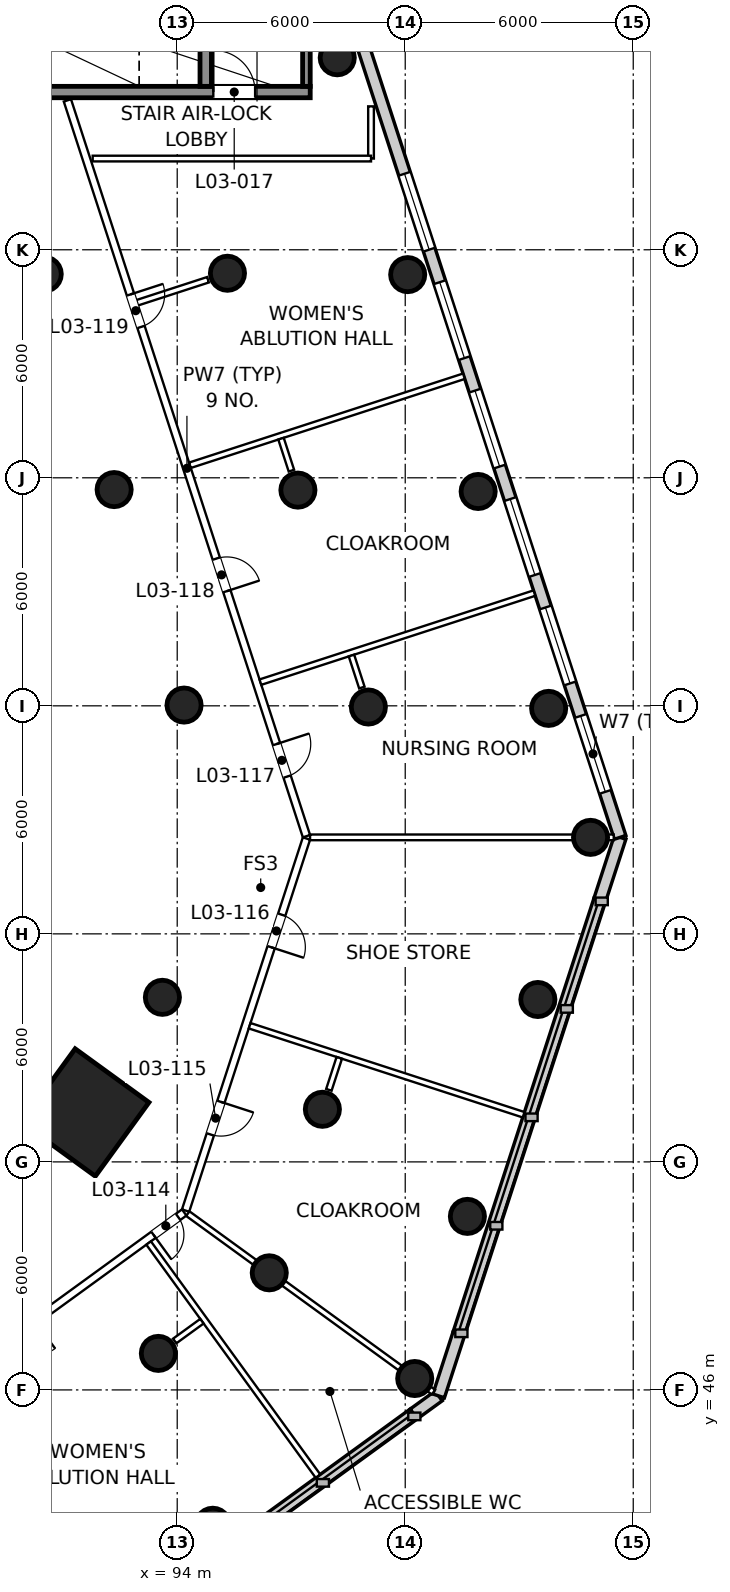
"""IFC4 building model, lengths in metres.
Left out: names, types, materials, properties, quantities, classifications, styles, units other than length and angle.
Written with IfcOpenShell. Run it as: python <this file> out.ifc"""

import sys

from ifc_helpers import new_model, si_unit, direction, frame, frame_2d, origin, origin_2d, place, context, subcontext, project, spatial, rectangle, circle, extrude, element, fill, save


model = new_model("IFC4")
c1 = context("Model", 3, precision=1e-05, world=origin(), true_north=direction((0.0, 1.0)))
c2 = subcontext(c1, "Body", "Model", "MODEL_VIEW")
j1 = project(units=[si_unit("LENGTHUNIT", "METRE"), si_unit("PLANEANGLEUNIT", "RADIAN")], contexts=[c1])
p1 = place(None, origin())
s1 = spatial("IfcSite", under=j1, at=p1, CompositionType="ELEMENT")
p2 = place(p1, origin())
s2 = spatial("IfcBuilding", under=s1, at=p2, CompositionType="ELEMENT")
p3 = place(p2, frame((0.0, 0.0, 23.0)))
s3 = spatial("IfcBuildingStorey", under=s2, at=p3, CompositionType="ELEMENT", Elevation=23.0)
p4 = place(p3, frame((91.58, 53.3, 0.0), z_axis=(0.0, 0.0, 1.0), x_axis=(0.809016994375, -0.587785252292, 0.0)))
e1 = element("IfcColumn", 1, at=p4, inside=s3, PredefinedType="COLUMN", context=c2, shape_type="SweptSolid", body=[
    extrude(rectangle(XDim=2.4, YDim=2.4, at=origin_2d()), origin(), (0.0, 0.0, 1.0), 6.0),
])
for number, where, z_axis, x_axis in (
    (2, (93.61, 56.33, 0.0), (0.0, 0.0, 1.0), (1.0, 0.0, 0.0)),
    (3, (94.18, 64.02, 0.0), (0.0, 0.0, 1.0), (1.0, 0.0, 0.0)),
    (4, (92.34, 69.69, 0.0), (0.0, 0.0, 1.0), (1.0, 0.0, 0.0)),
    (5, (90.5, 75.36, 0.0), (0.0, 0.0, 1.0), (1.0, 0.0, 0.0)),
    (6, (94.936, 42.439, 0.0), (0.0, 0.0, 1.0), (1.0, 0.0, 0.0)),
    (7, (100.25, 46.3, 0.0), (0.0, 0.0, 1.0), (1.0, 0.0, 0.0)),
    (8, (101.636, 50.566, 0.0), (0.0, 0.0, 1.0), (1.0, 0.0, 0.0)),
    (9, (103.49, 56.273, 0.0), (0.0, 0.0, 1.0), (1.0, 0.0, 0.0)),
    (10, (104.876, 60.539, 0.0), (0.0, 0.0, 1.0), (1.0, 0.0, 0.0)),
    (11, (103.774, 63.933, 0.0), (0.0, 0.0, 1.0), (1.0, 0.0, 0.0)),
    (12, (101.919, 69.64, 0.0), (0.0, 0.0, 1.0), (1.0, 0.0, 0.0)),
    (13, (100.065, 75.346, 0.0), (0.0, 0.0, 1.0), (1.0, 0.0, 0.0)),
    (14, (98.211, 81.052, 0.0), (0.0, 0.0, 1.0), (1.0, 0.0, 0.0)),
    (15, (93.504, 46.961, 0.0), (0.0, 0.0, 1.0), (1.0, 0.0, 0.0)),
    (16, (96.422, 49.081, 0.0), (0.0, 0.0, 1.0), (1.0, 0.0, 0.0)),
    (17, (97.82, 53.384, 0.0), (0.0, 0.0, 1.0), (1.0, 0.0, 0.0)),
    (18, (99.03, 63.969, 0.0), (0.0, 0.0, 1.0), (1.0, 0.0, 0.0)),
    (19, (97.176, 69.676, 0.0), (0.0, 0.0, 1.0), (1.0, 0.0, 0.0)),
    (20, (95.322, 75.382, 0.0), (0.0, 0.0, 1.0), (1.0, 0.0, 0.0)),
):
    element("IfcColumn", number, at=place(p3, frame(where, z_axis=z_axis, x_axis=x_axis)), inside=s3, PredefinedType="COLUMN", context=c2, shape_type="SweptSolid", body=[
        extrude(circle(Radius=0.45, at=origin_2d()), origin(), (0.0, 0.0, 1.0), 6.0),
    ])
p5 = place(p3, frame((78.381, 29.497, 0.0), z_axis=(0.0, 0.0, 1.0), x_axis=(0.809019086344, 0.587782372933, 0.0)))
e21 = element("IfcWall", 21, at=p5, inside=s3, PredefinedType="SOLIDWALL", context=c2, shape_type="SweptSolid", body=[
    extrude(rectangle(XDim=27.0, YDim=0.32, at=frame_2d((13.5, 0.0))), origin(), (0.0, 0.0, 1.0), 1.0),
])
p6 = place(p3, frame((100.225, 45.367, 0.0), z_axis=(0.0, 0.0, 1.0), x_axis=(0.808957761835, 0.587866770252, 0.0)))
e22 = element("IfcWall", 22, at=p6, inside=s3, PredefinedType="SOLIDWALL", context=c2, shape_type="SweptSolid", body=[
    extrude(rectangle(XDim=0.809, YDim=0.32, at=frame_2d((0.405, 0.0))), origin(), (0.0, 0.0, 1.0), 5.65),
])
p7 = place(p3, frame((100.879, 45.843, 0.0), z_axis=(0.0, 0.0, 1.0), x_axis=(0.309006126888, 0.951060047287, 0.0)))
e23 = element("IfcWall", 23, at=p7, inside=s3, PredefinedType="SOLIDWALL", context=c2, shape_type="SweptSolid", body=[
    extrude(rectangle(XDim=1.726, YDim=0.32, at=frame_2d((0.863, 0.0))), origin(), (0.0, 0.0, 1.0), 5.65),
])
p8 = place(p3, frame((101.413, 47.485, 0.0), z_axis=(0.0, 0.0, 1.0), x_axis=(0.309022586479, 0.951054699292, 0.0)))
e24 = element("IfcWall", 24, at=p8, inside=s3, PredefinedType="SOLIDWALL", context=c2, shape_type="SweptSolid", body=[
    extrude(rectangle(XDim=12.0, YDim=0.32, at=frame_2d((6.0, 0.0))), origin(), (0.0, 0.0, 1.0), 1.0),
])
p9 = place(p3, frame((105.121, 58.897, 0.0), z_axis=(0.0, 0.0, 1.0), x_axis=(0.309006126888, 0.951060047287, 0.0)))
e25 = element("IfcWall", 25, at=p9, inside=s3, PredefinedType="SOLIDWALL", context=c2, shape_type="SweptSolid", body=[
    extrude(rectangle(XDim=1.726, YDim=0.32, at=frame_2d((0.863, 0.0))), origin(), (0.0, 0.0, 1.0), 5.65),
])
p10 = place(p3, frame((105.655, 60.539, 0.0), z_axis=(0.0, 0.0, 1.0), x_axis=(-0.309020996945, 0.951055215772, 0.0)))
e26 = element("IfcWall", 26, at=p10, inside=s3, PredefinedType="SOLIDWALL", context=c2, shape_type="SweptSolid", body=[
    extrude(rectangle(XDim=25.704, YDim=0.32, at=frame_2d((12.852, 0.0))), origin(), (0.0, 0.0, 1.0), 5.65),
])
p11 = place(p10, frame((1.259, 0.0, 0.9)))
e27 = element("IfcOpeningElement", 27, at=p11, cuts=e26, PredefinedType="OPENING", context=c2, shape_type="SweptSolid", body=[
    extrude(rectangle(XDim=2.1, YDim=3.0, at=frame_2d((1.05, 1.5))), frame((0.0, 0.17, 0.0), z_axis=(0.0, -1.0, 0.0), x_axis=(1.0, 0.0, 0.0)), (0.0, 0.0, 1.0), 0.34),
])
p12 = place(p10, frame((4.259, 0.0, 0.9)))
e28 = element("IfcOpeningElement", 28, at=p12, cuts=e26, PredefinedType="OPENING", context=c2, shape_type="SweptSolid", body=[
    extrude(rectangle(XDim=2.1, YDim=3.0, at=frame_2d((1.05, 1.5))), frame((0.0, 0.17, 0.0), z_axis=(0.0, -1.0, 0.0), x_axis=(1.0, 0.0, 0.0)), (0.0, 0.0, 1.0), 0.34),
])
p13 = place(p10, frame((7.259, 0.0, 0.9)))
e29 = element("IfcOpeningElement", 29, at=p13, cuts=e26, PredefinedType="OPENING", context=c2, shape_type="SweptSolid", body=[
    extrude(rectangle(XDim=2.1, YDim=3.0, at=frame_2d((1.05, 1.5))), frame((0.0, 0.17, 0.0), z_axis=(0.0, -1.0, 0.0), x_axis=(1.0, 0.0, 0.0)), (0.0, 0.0, 1.0), 0.34),
])
p14 = place(p10, frame((10.259, 0.0, 0.9)))
e30 = element("IfcOpeningElement", 30, at=p14, cuts=e26, PredefinedType="OPENING", context=c2, shape_type="SweptSolid", body=[
    extrude(rectangle(XDim=2.1, YDim=3.0, at=frame_2d((1.05, 1.5))), frame((0.0, 0.17, 0.0), z_axis=(0.0, -1.0, 0.0), x_axis=(1.0, 0.0, 0.0)), (0.0, 0.0, 1.0), 0.34),
])
p15 = place(p10, frame((13.259, 0.0, 0.9)))
e31 = element("IfcOpeningElement", 31, at=p15, cuts=e26, PredefinedType="OPENING", context=c2, shape_type="SweptSolid", body=[
    extrude(rectangle(XDim=2.1, YDim=3.0, at=frame_2d((1.05, 1.5))), frame((0.0, 0.17, 0.0), z_axis=(0.0, -1.0, 0.0), x_axis=(1.0, 0.0, 0.0)), (0.0, 0.0, 1.0), 0.34),
])
p16 = place(p10, frame((16.259, 0.0, 0.9)))
e32 = element("IfcOpeningElement", 32, at=p16, cuts=e26, PredefinedType="OPENING", context=c2, shape_type="SweptSolid", body=[
    extrude(rectangle(XDim=2.1, YDim=3.0, at=frame_2d((1.05, 1.5))), frame((0.0, 0.17, 0.0), z_axis=(0.0, -1.0, 0.0), x_axis=(1.0, 0.0, 0.0)), (0.0, 0.0, 1.0), 0.34),
])
p17 = place(p3, frame((85.6, 80.15, 0.0), z_axis=(0.0, 0.0, 1.0), x_axis=(1.0, 0.0, 0.0)))
e33 = element("IfcWall", 33, at=p17, inside=s3, PredefinedType="SHEAR", context=c2, shape_type="SweptSolid", body=[
    extrude(rectangle(XDim=11.9, YDim=0.3, at=frame_2d((5.95, 0.0))), origin(), (0.0, 0.0, 1.0), 6.0),
])
p18 = place(p17, frame((9.35, 0.0, 0.0)))
e34 = element("IfcOpeningElement", 34, at=p18, cuts=e33, PredefinedType="OPENING", context=c2, shape_type="SweptSolid", body=[
    extrude(rectangle(XDim=1.1, YDim=2.1, at=frame_2d((0.55, 1.05))), frame((0.0, 0.16, 0.0), z_axis=(0.0, -1.0, 0.0), x_axis=(1.0, 0.0, 0.0)), (0.0, 0.0, 1.0), 0.32),
])
p19 = place(p3, frame((94.75, 80.3, 0.0), z_axis=(0.0, 0.0, 1.0), x_axis=(0.0, 1.0, 0.0)))
e35 = element("IfcWall", 35, at=p19, inside=s3, PredefinedType="SHEAR", context=c2, shape_type="SweptSolid", body=[
    extrude(rectangle(XDim=3.35, YDim=0.3, at=frame_2d((1.675, 0.0))), origin(), (0.0, 0.0, 1.0), 6.0),
])
p20 = place(p19, frame((1.075, 0.0, 0.0)))
e36 = element("IfcOpeningElement", 36, at=p20, cuts=e35, PredefinedType="OPENING", context=c2, shape_type="SweptSolid", body=[
    extrude(rectangle(XDim=1.2, YDim=2.1, at=frame_2d((0.6, 1.05))), frame((0.0, 0.16, 0.0), z_axis=(0.0, -1.0, 0.0), x_axis=(1.0, 0.0, 0.0)), (0.0, 0.0, 1.0), 0.32),
])
p21 = place(p3, frame((97.4, 80.3, 0.0), z_axis=(0.0, 0.0, 1.0), x_axis=(0.0, 1.0, 0.0)))
e37 = element("IfcWall", 37, at=p21, inside=s3, PredefinedType="SHEAR", context=c2, shape_type="SweptSolid", body=[
    extrude(rectangle(XDim=3.35, YDim=0.2, at=frame_2d((1.675, 0.0))), origin(), (0.0, 0.0, 1.0), 6.0),
])
p22 = place(p3, frame((91.11, 79.931, 0.0), z_axis=(0.0, 0.0, 1.0), x_axis=(0.309008514197, -0.95105927163, 0.0)))
e38 = element("IfcWall", 38, at=p22, inside=s3, PredefinedType="PARTITIONING", context=c2, shape_type="SweptSolid", body=[
    extrude(rectangle(XDim=20.357, YDim=0.2, at=frame_2d((10.179, 0.0))), origin(), (0.0, 0.0, 1.0), 5.65),
])
p23 = place(p22, frame((17.809, 0.0, 0.0)))
e39 = element("IfcOpeningElement", 39, at=p23, cuts=e38, PredefinedType="OPENING", context=c2, shape_type="SweptSolid", body=[
    extrude(rectangle(XDim=0.9, YDim=2.1, at=frame_2d((0.45, 1.05))), frame((0.0, 0.11, 0.0), z_axis=(0.0, -1.0, 0.0), x_axis=(1.0, 0.0, 0.0)), (0.0, 0.0, 1.0), 0.22),
])
p24 = place(p22, frame((12.678, 0.0, 0.0)))
e40 = element("IfcOpeningElement", 40, at=p24, cuts=e38, PredefinedType="OPENING", context=c2, shape_type="SweptSolid", body=[
    extrude(rectangle(XDim=0.9, YDim=2.1, at=frame_2d((0.45, 1.05))), frame((0.0, 0.11, 0.0), z_axis=(0.0, -1.0, 0.0), x_axis=(1.0, 0.0, 0.0)), (0.0, 0.0, 1.0), 0.22),
])
p25 = place(p22, frame((5.369, 0.0, 0.0)))
e41 = element("IfcOpeningElement", 41, at=p25, cuts=e38, PredefinedType="OPENING", context=c2, shape_type="SweptSolid", body=[
    extrude(rectangle(XDim=0.9, YDim=2.1, at=frame_2d((0.45, 1.05))), frame((0.0, 0.11, 0.0), z_axis=(0.0, -1.0, 0.0), x_axis=(1.0, 0.0, 0.0)), (0.0, 0.0, 1.0), 0.22),
])
p26 = place(p3, frame((97.401, 60.508, 0.0), z_axis=(0.0, 0.0, 1.0), x_axis=(-0.309010449617, -0.951058642791, 0.0)))
e42 = element("IfcWall", 42, at=p26, inside=s3, PredefinedType="PARTITIONING", context=c2, shape_type="SweptSolid", body=[
    extrude(rectangle(XDim=10.293, YDim=0.2, at=frame_2d((5.146, 0.0))), origin(), (0.0, 0.0, 1.0), 5.65),
])
p27 = place(p26, frame((7.286, 0.0, 0.0)))
e43 = element("IfcOpeningElement", 43, at=p27, cuts=e42, PredefinedType="OPENING", context=c2, shape_type="SweptSolid", body=[
    extrude(rectangle(XDim=0.9, YDim=2.1, at=frame_2d((0.45, 1.05))), frame((0.0, 0.11, 0.0), z_axis=(0.0, -1.0, 0.0), x_axis=(1.0, 0.0, 0.0)), (0.0, 0.0, 1.0), 0.22),
])
p28 = place(p26, frame((2.107, 0.0, 0.0)))
e44 = element("IfcOpeningElement", 44, at=p28, cuts=e42, PredefinedType="OPENING", context=c2, shape_type="SweptSolid", body=[
    extrude(rectangle(XDim=0.9, YDim=2.1, at=frame_2d((0.45, 1.05))), frame((0.0, 0.11, 0.0), z_axis=(0.0, -1.0, 0.0), x_axis=(1.0, 0.0, 0.0)), (0.0, 0.0, 1.0), 0.22),
])
p29 = place(p3, frame((94.184, 50.669, 0.0), z_axis=(0.0, 0.0, 1.0), x_axis=(-0.809025571226, -0.587773447089, 0.0)))
e45 = element("IfcWall", 45, at=p29, inside=s3, PredefinedType="PARTITIONING", context=c2, shape_type="SweptSolid", body=[
    extrude(rectangle(XDim=11.156, YDim=0.2, at=frame_2d((5.578, 0.0))), origin(), (0.0, 0.0, 1.0), 5.65),
])
p30 = place(p29, frame((4.852, 0.0, 0.0)))
e46 = element("IfcOpeningElement", 46, at=p30, cuts=e45, PredefinedType="OPENING", context=c2, shape_type="SweptSolid", body=[
    extrude(rectangle(XDim=0.9, YDim=2.1, at=frame_2d((0.45, 1.05))), frame((0.0, 0.11, 0.0), z_axis=(0.0, -1.0, 0.0), x_axis=(1.0, 0.0, 0.0)), (0.0, 0.0, 1.0), 0.22),
])
p31 = place(p29, frame((0.198, 0.0, 0.0)))
e47 = element("IfcOpeningElement", 47, at=p31, cuts=e45, PredefinedType="OPENING", context=c2, shape_type="SweptSolid", body=[
    extrude(rectangle(XDim=0.8, YDim=2.1, at=frame_2d((0.4, 1.05))), frame((0.0, 0.11, 0.0), z_axis=(0.0, -1.0, 0.0), x_axis=(1.0, 0.0, 0.0)), (0.0, 0.0, 1.0), 0.22),
])
p32 = place(p3, frame((100.743, 45.942, 0.0), z_axis=(0.0, 0.0, 1.0), x_axis=(-0.80901214883, 0.587791921556, 0.0)))
e48 = element("IfcWall", 48, at=p32, inside=s3, PredefinedType="PARTITIONING", context=c2, shape_type="SweptSolid", body=[
    extrude(rectangle(XDim=7.99, YDim=0.15, at=frame_2d((3.995, 0.0))), origin(), (0.0, 0.0, 1.0), 5.65),
])
p33 = place(p3, frame((105.486, 60.539, 0.0), z_axis=(0.0, 0.0, 1.0), x_axis=(-1.0, 0.0, 0.0)))
e49 = element("IfcWall", 49, at=p33, inside=s3, PredefinedType="PARTITIONING", context=c2, shape_type="SweptSolid", body=[
    extrude(rectangle(XDim=7.99, YDim=0.15, at=frame_2d((3.995, 0.0))), origin(), (0.0, 0.0, 1.0), 4.75),
])
p34 = place(p3, frame((97.704, 43.733, 0.0), z_axis=(0.0, 0.0, 1.0), x_axis=(-0.587800109381, 0.80900619986, 0.0)))
e50 = element("IfcWall", 50, at=p34, inside=s3, PredefinedType="PARTITIONING", context=c2, shape_type="SweptSolid", body=[
    extrude(rectangle(XDim=7.58, YDim=0.15, at=frame_2d((3.79, 0.0))), origin(), (0.0, 0.0, 1.0), 4.95),
])
p35 = place(p3, frame((103.115, 53.24, 0.0), z_axis=(0.0, 0.0, 1.0), x_axis=(-0.951058681979, 0.309010329007, 0.0)))
e51 = element("IfcWall", 51, at=p35, inside=s3, PredefinedType="PARTITIONING", context=c2, shape_type="SweptSolid", body=[
    extrude(rectangle(XDim=7.58, YDim=0.15, at=frame_2d((3.79, 0.0))), origin(), (0.0, 0.0, 1.0), 4.75),
])
p36 = place(p3, frame((103.398, 66.966, 0.0), z_axis=(0.0, 0.0, 1.0), x_axis=(-0.951049215908, -0.309039461753, 0.0)))
e52 = element("IfcWall", 52, at=p36, inside=s3, PredefinedType="PARTITIONING", context=c2, shape_type="SweptSolid", body=[
    extrude(rectangle(XDim=7.58, YDim=0.15, at=frame_2d((3.79, 0.0))), origin(), (0.0, 0.0, 1.0), 4.95),
])
p37 = place(p3, frame((101.544, 72.672, 0.0), z_axis=(0.0, 0.0, 1.0), x_axis=(-0.951052291841, -0.309029995605, 0.0)))
e53 = element("IfcWall", 53, at=p37, inside=s3, PredefinedType="PARTITIONING", context=c2, shape_type="SweptSolid", body=[
    extrude(rectangle(XDim=7.58, YDim=0.15, at=frame_2d((3.79, 0.0))), origin(), (0.0, 0.0, 1.0), 4.95),
])
p38 = place(p3, frame((93.934, 47.288, 0.0), z_axis=(0.0, 0.0, 1.0), x_axis=(0.809105603792, 0.587663272557, 0.0)))
e54 = element("IfcWall", 54, at=p38, inside=s3, PredefinedType="PARTITIONING", context=c2, shape_type="SweptSolid", body=[
    extrude(rectangle(XDim=0.885, YDim=0.15, at=frame_2d((0.443, 0.0))), origin(), (0.0, 0.0, 1.0), 4.95),
])
p39 = place(p3, frame((97.991, 53.896, 0.0), z_axis=(0.0, 0.0, 1.0), x_axis=(0.308848908026, 0.95111111444, 0.0)))
e55 = element("IfcWall", 55, at=p39, inside=s3, PredefinedType="PARTITIONING", context=c2, shape_type="SweptSolid", body=[
    extrude(rectangle(XDim=0.885, YDim=0.15, at=frame_2d((0.442, 0.0))), origin(), (0.0, 0.0, 1.0), 4.75),
])
p40 = place(p3, frame((98.859, 64.481, 0.0), z_axis=(0.0, 0.0, 1.0), x_axis=(-0.30918585584, 0.951001633305, 0.0)))
e56 = element("IfcWall", 56, at=p40, inside=s3, PredefinedType="PARTITIONING", context=c2, shape_type="SweptSolid", body=[
    extrude(rectangle(XDim=0.885, YDim=0.15, at=frame_2d((0.443, 0.0))), origin(), (0.0, 0.0, 1.0), 4.95),
])
p41 = place(p3, frame((97.005, 70.188, 0.0), z_axis=(0.0, 0.0, 1.0), x_axis=(-0.309017445354, 0.951056369763, 0.0)))
e57 = element("IfcWall", 57, at=p41, inside=s3, PredefinedType="PARTITIONING", context=c2, shape_type="SweptSolid", body=[
    extrude(rectangle(XDim=0.885, YDim=0.15, at=frame_2d((0.442, 0.0))), origin(), (0.0, 0.0, 1.0), 4.95),
])
p42 = place(p3, frame((94.81, 75.211, 0.0), z_axis=(0.0, 0.0, 1.0), x_axis=(-0.951047798727, -0.309043823005, 0.0)))
e58 = element("IfcWall", 58, at=p42, inside=s3, PredefinedType="PARTITIONING", context=c2, shape_type="SweptSolid", body=[
    extrude(rectangle(XDim=1.96, YDim=0.15, at=frame_2d((0.98, 0.0))), origin(), (0.0, 0.0, 1.0), 5.65),
])
p43 = place(p3, frame((99.1, 78.4, 0.0), z_axis=(0.0, 0.0, 1.0), x_axis=(0.0, 1.0, 0.0)))
e59 = element("IfcWall", 59, at=p43, inside=s3, PredefinedType="PARTITIONING", context=c2, shape_type="SweptSolid", body=[
    extrude(rectangle(XDim=1.374, YDim=0.15, at=frame_2d((0.687, 0.0))), origin(), (0.0, 0.0, 1.0), 4.95),
])
p44 = place(p3, frame((91.776, 78.4, 0.0), z_axis=(0.0, 0.0, 1.0), x_axis=(1.0, 0.0, 0.0)))
e60 = element("IfcWall", 60, at=p44, inside=s3, PredefinedType="PARTITIONING", context=c2, shape_type="SweptSolid", body=[
    extrude(rectangle(XDim=7.324, YDim=0.15, at=frame_2d((3.662, 0.0))), origin(), (0.0, 0.0, 1.0), 4.95),
])
p45 = place(p11, origin())
e61 = element("IfcWindow", 61, at=p45, inside=s3, PartitioningType="SINGLE_PANEL", PredefinedType="WINDOW", context=c2, shape_type="SweptSolid", body=[
    extrude(rectangle(XDim=2.1, YDim=3.0, at=frame_2d((1.05, 1.5))), frame((0.0, 0.07, 0.0), z_axis=(0.0, -1.0, 0.0), x_axis=(1.0, 0.0, 0.0)), (0.0, 0.0, 1.0), 0.06),
])
fill(e27, e61)
p46 = place(p12, origin())
e62 = element("IfcWindow", 62, at=p46, inside=s3, PartitioningType="SINGLE_PANEL", PredefinedType="WINDOW", context=c2, shape_type="SweptSolid", body=[
    extrude(rectangle(XDim=2.1, YDim=3.0, at=frame_2d((1.05, 1.5))), frame((0.0, 0.07, 0.0), z_axis=(0.0, -1.0, 0.0), x_axis=(1.0, 0.0, 0.0)), (0.0, 0.0, 1.0), 0.06),
])
fill(e28, e62)
p47 = place(p13, origin())
e63 = element("IfcWindow", 63, at=p47, inside=s3, PartitioningType="SINGLE_PANEL", PredefinedType="WINDOW", context=c2, shape_type="SweptSolid", body=[
    extrude(rectangle(XDim=2.1, YDim=3.0, at=frame_2d((1.05, 1.5))), frame((0.0, 0.07, 0.0), z_axis=(0.0, -1.0, 0.0), x_axis=(1.0, 0.0, 0.0)), (0.0, 0.0, 1.0), 0.06),
])
fill(e29, e63)
p48 = place(p14, origin())
e64 = element("IfcWindow", 64, at=p48, inside=s3, PartitioningType="SINGLE_PANEL", PredefinedType="WINDOW", context=c2, shape_type="SweptSolid", body=[
    extrude(rectangle(XDim=2.1, YDim=3.0, at=frame_2d((1.05, 1.5))), frame((0.0, 0.07, 0.0), z_axis=(0.0, -1.0, 0.0), x_axis=(1.0, 0.0, 0.0)), (0.0, 0.0, 1.0), 0.06),
])
fill(e30, e64)
p49 = place(p15, origin())
e65 = element("IfcWindow", 65, at=p49, inside=s3, PartitioningType="SINGLE_PANEL", PredefinedType="WINDOW", context=c2, shape_type="SweptSolid", body=[
    extrude(rectangle(XDim=2.1, YDim=3.0, at=frame_2d((1.05, 1.5))), frame((0.0, 0.07, 0.0), z_axis=(0.0, -1.0, 0.0), x_axis=(1.0, 0.0, 0.0)), (0.0, 0.0, 1.0), 0.06),
])
fill(e31, e65)
p50 = place(p16, origin())
e66 = element("IfcWindow", 66, at=p50, inside=s3, PartitioningType="SINGLE_PANEL", PredefinedType="WINDOW", context=c2, shape_type="SweptSolid", body=[
    extrude(rectangle(XDim=2.1, YDim=3.0, at=frame_2d((1.05, 1.5))), frame((0.0, 0.07, 0.0), z_axis=(0.0, -1.0, 0.0), x_axis=(1.0, 0.0, 0.0)), (0.0, 0.0, 1.0), 0.06),
])
fill(e32, e66)
p51 = place(p18, origin())
e67 = element("IfcDoor", 67, at=p51, inside=s3, OperationType="SINGLE_SWING_LEFT", PredefinedType="DOOR", context=c2, shape_type="SweptSolid", body=[
    extrude(rectangle(XDim=1.1, YDim=2.1, at=frame_2d((0.55, 1.05))), frame((0.0, 0.025, 0.0), z_axis=(0.0, -1.0, 0.0), x_axis=(1.0, 0.0, 0.0)), (0.0, 0.0, 1.0), 0.05),
])
fill(e34, e67)
p52 = place(p31, origin())
e68 = element("IfcDoor", 68, at=p52, inside=s3, OperationType="SINGLE_SWING_RIGHT", PredefinedType="DOOR", context=c2, shape_type="SweptSolid", body=[
    extrude(rectangle(XDim=0.8, YDim=2.1, at=frame_2d((0.4, 1.05))), frame((0.0, 0.025, 0.0), z_axis=(0.0, -1.0, 0.0), x_axis=(1.0, 0.0, 0.0)), (0.0, 0.0, 1.0), 0.05),
])
fill(e47, e68)
p53 = place(p27, origin())
e69 = element("IfcDoor", 69, at=p53, inside=s3, OperationType="SINGLE_SWING_LEFT", PredefinedType="DOOR", context=c2, shape_type="SweptSolid", body=[
    extrude(rectangle(XDim=0.9, YDim=2.1, at=frame_2d((0.45, 1.05))), frame((0.0, 0.025, 0.0), z_axis=(0.0, -1.0, 0.0), x_axis=(1.0, 0.0, 0.0)), (0.0, 0.0, 1.0), 0.05),
])
fill(e43, e69)
p54 = place(p28, origin())
e70 = element("IfcDoor", 70, at=p54, inside=s3, OperationType="SINGLE_SWING_RIGHT", PredefinedType="DOOR", context=c2, shape_type="SweptSolid", body=[
    extrude(rectangle(XDim=0.9, YDim=2.1, at=frame_2d((0.45, 1.05))), frame((0.0, 0.025, 0.0), z_axis=(0.0, -1.0, 0.0), x_axis=(1.0, 0.0, 0.0)), (0.0, 0.0, 1.0), 0.05),
])
fill(e44, e70)
p55 = place(p23, origin())
e71 = element("IfcDoor", 71, at=p55, inside=s3, OperationType="SINGLE_SWING_LEFT", PredefinedType="DOOR", context=c2, shape_type="SweptSolid", body=[
    extrude(rectangle(XDim=0.9, YDim=2.1, at=frame_2d((0.45, 1.05))), frame((0.0, 0.025, 0.0), z_axis=(0.0, -1.0, 0.0), x_axis=(1.0, 0.0, 0.0)), (0.0, 0.0, 1.0), 0.05),
])
fill(e39, e71)
p56 = place(p24, origin())
e72 = element("IfcDoor", 72, at=p56, inside=s3, OperationType="SINGLE_SWING_RIGHT", PredefinedType="DOOR", context=c2, shape_type="SweptSolid", body=[
    extrude(rectangle(XDim=0.9, YDim=2.1, at=frame_2d((0.45, 1.05))), frame((0.0, 0.025, 0.0), z_axis=(0.0, -1.0, 0.0), x_axis=(1.0, 0.0, 0.0)), (0.0, 0.0, 1.0), 0.05),
])
fill(e40, e72)
p57 = place(p25, origin())
e73 = element("IfcDoor", 73, at=p57, inside=s3, OperationType="SINGLE_SWING_LEFT", PredefinedType="DOOR", context=c2, shape_type="SweptSolid", body=[
    extrude(rectangle(XDim=0.9, YDim=2.1, at=frame_2d((0.45, 1.05))), frame((0.0, 0.025, 0.0), z_axis=(0.0, -1.0, 0.0), x_axis=(1.0, 0.0, 0.0)), (0.0, 0.0, 1.0), 0.05),
])
fill(e41, e73)
save(model, sys.argv[1])
